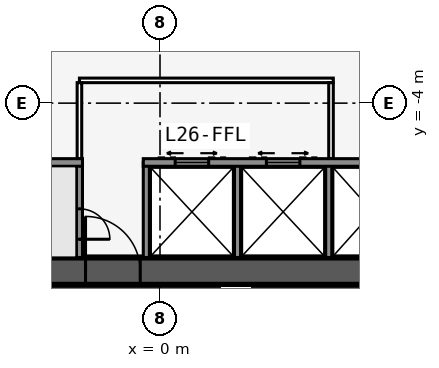
"""IFC4 building model, lengths in metres.
Left out: names, types, materials, properties, quantities, classifications, styles, units other than length and angle.
Written with IfcOpenShell. Run it as: python <this file> out.ifc"""

import sys

from ifc_helpers import new_model, si_unit, direction, frame, frame_2d, origin, place, context, subcontext, project, spatial, rectangle, extrude, element, fill, save


model = new_model("IFC4")
c1 = context("Model", 3, precision=1e-05, world=origin(), true_north=direction((0.0, 1.0)))
c2 = subcontext(c1, "Body", "Model", "MODEL_VIEW")
j1 = project(units=[si_unit("LENGTHUNIT", "METRE"), si_unit("PLANEANGLEUNIT", "RADIAN")], contexts=[c1])
p1 = place(None, origin())
s1 = spatial("IfcSite", under=j1, at=p1, CompositionType="ELEMENT")
p2 = place(p1, origin())
s2 = spatial("IfcBuilding", under=s1, at=p2, CompositionType="ELEMENT")
p3 = place(p2, frame((0.0, 0.0, 99.9)))
s3 = spatial("IfcBuildingStorey", under=s2, at=p3, CompositionType="ELEMENT", Elevation=99.9)
p4 = place(p3, frame((-16.5, -9.526, 0.0), z_axis=(0.0, 0.0, 1.0), x_axis=(1.0, 0.0, 0.0)))
e1 = element("IfcWall", 1, at=p4, inside=s3, PredefinedType="SHEAR", context=c2, shape_type="SweptSolid", body=[
    extrude(rectangle(XDim=33.0, YDim=0.9, at=frame_2d((16.5, 0.0))), origin(), (0.0, 0.0, 1.0), 3.4),
])
p5 = place(p4, frame((14.05, 0.0, 0.0)))
e2 = element("IfcOpeningElement", 2, at=p5, cuts=e1, PredefinedType="OPENING", context=c2, shape_type="SweptSolid", body=[
    extrude(rectangle(XDim=1.8, YDim=2.13, at=frame_2d((0.9, 1.065))), frame((0.0, 0.46, 0.0), z_axis=(0.0, -1.0, 0.0), x_axis=(1.0, 0.0, 0.0)), (0.0, 0.0, 1.0), 0.92),
])
p6 = place(p3, frame((-10.183, -5.951, 0.0), z_axis=(0.0, 0.0, 1.0), x_axis=(1.0, 0.0, 0.0)))
e3 = element("IfcWall", 3, at=p6, inside=s3, PredefinedType="SOLIDWALL", context=c2, shape_type="SweptSolid", body=[
    extrude(rectangle(XDim=7.633, YDim=0.25, at=frame_2d((3.816, 0.0))), origin(), (0.0, 0.0, 1.0), 3.15),
])
p7 = place(p3, frame((-0.55, -5.951, 0.0), z_axis=(0.0, 0.0, 1.0), x_axis=(1.0, 0.0, 0.0)))
e4 = element("IfcWall", 4, at=p7, inside=s3, PredefinedType="SOLIDWALL", context=c2, shape_type="SweptSolid", body=[
    extrude(rectangle(XDim=10.733, YDim=0.25, at=frame_2d((5.366, 0.0))), origin(), (0.0, 0.0, 1.0), 3.15),
])
p8 = place(p7, frame((9.314, 0.0, 0.0)))
e5 = element("IfcOpeningElement", 5, at=p8, cuts=e4, PredefinedType="OPENING", context=c2, shape_type="SweptSolid", body=[
    extrude(rectangle(XDim=0.9, YDim=2.13, at=frame_2d((0.45, 1.065))), frame((0.0, 0.135, 0.0), z_axis=(0.0, -1.0, 0.0), x_axis=(1.0, 0.0, 0.0)), (0.0, 0.0, 1.0), 0.27),
])
p9 = place(p7, frame((1.05, 0.0, 0.0)))
e6 = element("IfcOpeningElement", 6, at=p9, cuts=e4, PredefinedType="OPENING", context=c2, shape_type="SweptSolid", body=[
    extrude(rectangle(XDim=1.1, YDim=2.13, at=frame_2d((0.55, 1.065))), frame((0.0, 0.135, 0.0), z_axis=(0.0, -1.0, 0.0), x_axis=(1.0, 0.0, 0.0)), (0.0, 0.0, 1.0), 0.27),
])
p10 = place(p7, frame((4.05, 0.0, 0.0)))
e7 = element("IfcOpeningElement", 7, at=p10, cuts=e4, PredefinedType="OPENING", context=c2, shape_type="SweptSolid", body=[
    extrude(rectangle(XDim=1.1, YDim=2.13, at=frame_2d((0.55, 1.065))), frame((0.0, 0.135, 0.0), z_axis=(0.0, -1.0, 0.0), x_axis=(1.0, 0.0, 0.0)), (0.0, 0.0, 1.0), 0.27),
])
p11 = place(p3, frame((-2.65, -5.951, 0.0), z_axis=(0.0, 0.0, 1.0), x_axis=(0.0, -1.0, 0.0)))
e8 = element("IfcWall", 8, at=p11, inside=s3, PredefinedType="SOLIDWALL", context=c2, shape_type="SweptSolid", body=[
    extrude(rectangle(XDim=3.125, YDim=0.2, at=frame_2d((1.562, 0.0))), origin(), (0.0, 0.0, 1.0), 3.15),
])
p12 = place(p11, frame((1.525, 0.0, 0.0)))
e9 = element("IfcOpeningElement", 9, at=p12, cuts=e8, PredefinedType="OPENING", context=c2, shape_type="SweptSolid", body=[
    extrude(rectangle(XDim=1.0, YDim=2.13, at=frame_2d((0.5, 1.065))), frame((0.0, 0.11, 0.0), z_axis=(0.0, -1.0, 0.0), x_axis=(1.0, 0.0, 0.0)), (0.0, 0.0, 1.0), 0.22),
])
for number, where, z_axis, x_axis in (
    (10, (-0.45, -5.951, 0.0), (0.0, 0.0, 1.0), (0.0, -1.0, 0.0)),
    (11, (2.55, -5.951, 0.0), (0.0, 0.0, 1.0), (0.0, -1.0, 0.0)),
    (12, (5.55, -5.951, 0.0), (0.0, 0.0, 1.0), (0.0, -1.0, 0.0)),
):
    element("IfcWall", number, at=place(p3, frame(where, z_axis=z_axis, x_axis=x_axis)), inside=s3, PredefinedType="SOLIDWALL", context=c2, shape_type="SweptSolid", body=[
        extrude(rectangle(XDim=3.125, YDim=0.2, at=frame_2d((1.562, 0.0))), origin(), (0.0, 0.0, 1.0), 3.15),
    ])
p13 = place(p3, frame((16.5, -9.526, 0.0), z_axis=(0.0, 0.0, 1.0), x_axis=(-0.499999749417, 0.866025548458, 0.0)))
e13 = element("IfcWall", 13, at=p13, inside=s3, PredefinedType="SHEAR", context=c2, shape_type="SweptSolid", body=[
    extrude(rectangle(XDim=33.0, YDim=0.9, at=frame_2d((16.5, 0.0))), origin(), (0.0, 0.0, 1.0), 3.4),
])
p14 = place(p13, frame((14.15, 0.0, 0.0)))
e14 = element("IfcOpeningElement", 14, at=p14, cuts=e13, PredefinedType="OPENING", context=c2, shape_type="SweptSolid", body=[
    extrude(rectangle(XDim=1.8, YDim=2.13, at=frame_2d((0.9, 1.065))), frame((0.0, 0.46, 0.0), z_axis=(0.0, -1.0, 0.0), x_axis=(1.0, 0.0, 0.0)), (0.0, 0.0, 1.0), 0.92),
])
p15 = place(p13, frame((12.6, 0.0, 0.0)))
e15 = element("IfcOpeningElement", 15, at=p15, cuts=e13, PredefinedType="OPENING", context=c2, shape_type="SweptSolid", body=[
    extrude(rectangle(XDim=1.0, YDim=2.13, at=frame_2d((0.5, 1.065))), frame((0.0, 0.46, 0.0), z_axis=(0.0, -1.0, 0.0), x_axis=(1.0, 0.0, 0.0)), (0.0, 0.0, 1.0), 0.92),
])
p16 = place(p3, frame((10.245, -5.843, 0.0), z_axis=(0.0, 0.0, 1.0), x_axis=(-0.499993009313, 0.866029439822, 0.0)))
e16 = element("IfcWall", 16, at=p16, inside=s3, PredefinedType="SOLIDWALL", context=c2, shape_type="SweptSolid", body=[
    extrude(rectangle(XDim=7.733, YDim=0.25, at=frame_2d((3.866, 0.0))), origin(), (0.0, 0.0, 1.0), 3.15),
])
p17 = place(p3, frame((0.0, 19.052, 0.0), z_axis=(0.0, 0.0, 1.0), x_axis=(-0.499999749417, -0.866025548458, 0.0)))
e17 = element("IfcWall", 17, at=p17, inside=s3, PredefinedType="SHEAR", context=c2, shape_type="SweptSolid", body=[
    extrude(rectangle(XDim=33.0, YDim=0.9, at=frame_2d((16.5, 0.0))), origin(), (0.0, 0.0, 1.0), 3.4),
])
p18 = place(p17, frame((14.15, 0.0, 0.0)))
e18 = element("IfcOpeningElement", 18, at=p18, cuts=e17, PredefinedType="OPENING", context=c2, shape_type="SweptSolid", body=[
    extrude(rectangle(XDim=1.8, YDim=2.13, at=frame_2d((0.9, 1.065))), frame((0.0, 0.46, 0.0), z_axis=(0.0, -1.0, 0.0), x_axis=(1.0, 0.0, 0.0)), (0.0, 0.0, 1.0), 0.92),
])
p19 = place(p17, frame((12.6, 0.0, 0.0)))
e19 = element("IfcOpeningElement", 19, at=p19, cuts=e17, PredefinedType="OPENING", context=c2, shape_type="SweptSolid", body=[
    extrude(rectangle(XDim=1.0, YDim=2.13, at=frame_2d((0.5, 1.065))), frame((0.0, 0.46, 0.0), z_axis=(0.0, -1.0, 0.0), x_axis=(1.0, 0.0, 0.0)), (0.0, 0.0, 1.0), 0.92),
])
p20 = place(p3, frame((20.027, -10.985, 0.0), z_axis=(0.0, 0.0, 1.0), x_axis=(-0.500001677587, 0.866024435227, 0.0)))
e20 = element("IfcWall", 20, at=p20, inside=s3, PredefinedType="PARTITIONING", context=c2, shape_type="SweptSolid", body=[
    extrude(rectangle(XDim=39.054, YDim=0.15, at=frame_2d((19.527, 0.0))), origin(), (0.0, 0.0, 1.0), 3.15),
])
p21 = place(p20, frame((1.558, 0.0, 0.0)))
e21 = element("IfcOpeningElement", 21, at=p21, cuts=e20, PredefinedType="OPENING", context=c2, shape_type="SweptSolid", body=[
    extrude(rectangle(XDim=0.95, YDim=2.13, at=frame_2d((0.475, 1.065))), frame((0.0, 0.085, 0.0), z_axis=(0.0, -1.0, 0.0), x_axis=(1.0, 0.0, 0.0)), (0.0, 0.0, 1.0), 0.17),
])
p22 = place(p20, frame((11.552, 0.0, 0.0)))
e22 = element("IfcOpeningElement", 22, at=p22, cuts=e20, PredefinedType="OPENING", context=c2, shape_type="SweptSolid", body=[
    extrude(rectangle(XDim=0.95, YDim=2.13, at=frame_2d((0.475, 1.065))), frame((0.0, 0.085, 0.0), z_axis=(0.0, -1.0, 0.0), x_axis=(1.0, 0.0, 0.0)), (0.0, 0.0, 1.0), 0.17),
])
p23 = place(p20, frame((22.752, 0.0, 0.0)))
e23 = element("IfcOpeningElement", 23, at=p23, cuts=e20, PredefinedType="OPENING", context=c2, shape_type="SweptSolid", body=[
    extrude(rectangle(XDim=0.95, YDim=2.13, at=frame_2d((0.475, 1.065))), frame((0.0, 0.085, 0.0), z_axis=(0.0, -1.0, 0.0), x_axis=(1.0, 0.0, 0.0)), (0.0, 0.0, 1.0), 0.17),
])
p24 = place(p20, frame((36.546, 0.0, 0.0)))
e24 = element("IfcOpeningElement", 24, at=p24, cuts=e20, PredefinedType="OPENING", context=c2, shape_type="SweptSolid", body=[
    extrude(rectangle(XDim=0.95, YDim=2.13, at=frame_2d((0.475, 1.065))), frame((0.0, 0.085, 0.0), z_axis=(0.0, -1.0, 0.0), x_axis=(1.0, 0.0, 0.0)), (0.0, 0.0, 1.0), 0.17),
])
p25 = place(p3, frame((-0.5, 24.636, 0.0), z_axis=(0.0, 0.0, 1.0), x_axis=(-0.500001915564, -0.86602429783, 0.0)))
e25 = element("IfcWall", 25, at=p25, inside=s3, PredefinedType="PARTITIONING", context=c2, shape_type="SweptSolid", body=[
    extrude(rectangle(XDim=42.172, YDim=0.15, at=frame_2d((21.086, 0.0))), origin(), (0.0, 0.0, 1.0), 3.15),
])
p26 = place(p25, frame((1.911, 0.0, 0.0)))
e26 = element("IfcOpeningElement", 26, at=p26, cuts=e25, PredefinedType="OPENING", context=c2, shape_type="SweptSolid", body=[
    extrude(rectangle(XDim=0.95, YDim=2.13, at=frame_2d((0.475, 1.065))), frame((0.0, 0.085, 0.0), z_axis=(0.0, -1.0, 0.0), x_axis=(1.0, 0.0, 0.0)), (0.0, 0.0, 1.0), 0.17),
])
p27 = place(p25, frame((8.111, 0.0, 0.0)))
e27 = element("IfcOpeningElement", 27, at=p27, cuts=e25, PredefinedType="OPENING", context=c2, shape_type="SweptSolid", body=[
    extrude(rectangle(XDim=0.95, YDim=2.13, at=frame_2d((0.475, 1.065))), frame((0.0, 0.085, 0.0), z_axis=(0.0, -1.0, 0.0), x_axis=(1.0, 0.0, 0.0)), (0.0, 0.0, 1.0), 0.17),
])
p28 = place(p25, frame((18.111, 0.0, 0.0)))
e28 = element("IfcOpeningElement", 28, at=p28, cuts=e25, PredefinedType="OPENING", context=c2, shape_type="SweptSolid", body=[
    extrude(rectangle(XDim=0.95, YDim=2.13, at=frame_2d((0.475, 1.065))), frame((0.0, 0.085, 0.0), z_axis=(0.0, -1.0, 0.0), x_axis=(1.0, 0.0, 0.0)), (0.0, 0.0, 1.0), 0.17),
])
p29 = place(p25, frame((28.711, 0.0, 0.0)))
e29 = element("IfcOpeningElement", 29, at=p29, cuts=e25, PredefinedType="OPENING", context=c2, shape_type="SweptSolid", body=[
    extrude(rectangle(XDim=0.95, YDim=2.13, at=frame_2d((0.475, 1.065))), frame((0.0, 0.085, 0.0), z_axis=(0.0, -1.0, 0.0), x_axis=(1.0, 0.0, 0.0)), (0.0, 0.0, 1.0), 0.17),
])
p30 = place(p25, frame((33.711, 0.0, 0.0)))
e30 = element("IfcOpeningElement", 30, at=p30, cuts=e25, PredefinedType="OPENING", context=c2, shape_type="SweptSolid", body=[
    extrude(rectangle(XDim=0.95, YDim=2.13, at=frame_2d((0.475, 1.065))), frame((0.0, 0.085, 0.0), z_axis=(0.0, -1.0, 0.0), x_axis=(1.0, 0.0, 0.0)), (0.0, 0.0, 1.0), 0.17),
])
p31 = place(p25, frame((39.311, 0.0, 0.0)))
e31 = element("IfcOpeningElement", 31, at=p31, cuts=e25, PredefinedType="OPENING", context=c2, shape_type="SweptSolid", body=[
    extrude(rectangle(XDim=0.95, YDim=2.13, at=frame_2d((0.475, 1.065))), frame((0.0, 0.085, 0.0), z_axis=(0.0, -1.0, 0.0), x_axis=(1.0, 0.0, 0.0)), (0.0, 0.0, 1.0), 0.17),
])
p32 = place(p3, frame((-2.65, -3.251, 0.0), z_axis=(0.0, 0.0, 1.0), x_axis=(1.0, 0.0, 0.0)))
e32 = element("IfcWall", 32, at=p32, inside=s3, PredefinedType="PARTITIONING", context=c2, shape_type="SweptSolid", body=[
    extrude(rectangle(XDim=8.35, YDim=0.15, at=frame_2d((4.175, 0.0))), origin(), (0.0, 0.0, 1.0), 3.15),
])
for number, where, z_axis, x_axis in (
    (33, (-2.65, -5.826, 0.0), (0.0, 0.0, 1.0), (0.0, 1.0, 0.0)),
    (34, (5.625, -5.826, 0.0), (0.0, 0.0, 1.0), (0.0, 1.0, 0.0)),
):
    element("IfcWall", number, at=place(p3, frame(where, z_axis=z_axis, x_axis=x_axis)), inside=s3, PredefinedType="PARTITIONING", context=c2, shape_type="SweptSolid", body=[
        extrude(rectangle(XDim=2.5, YDim=0.15, at=frame_2d((1.25, 0.0))), origin(), (0.0, 0.0, 1.0), 3.15),
    ])
p33 = place(p5, origin())
e35 = element("IfcDoor", 35, at=p33, inside=s3, OperationType="DOUBLE_DOOR_SINGLE_SWING", PredefinedType="DOOR", context=c2, shape_type="SweptSolid", body=[
    extrude(rectangle(XDim=1.8, YDim=2.13, at=frame_2d((0.9, 1.065))), frame((0.0, 0.025, 0.0), z_axis=(0.0, -1.0, 0.0), x_axis=(1.0, 0.0, 0.0)), (0.0, 0.0, 1.0), 0.05),
])
fill(e2, e35)
p34 = place(p12, origin())
e36 = element("IfcDoor", 36, at=p34, inside=s3, OperationType="SINGLE_SWING_RIGHT", PredefinedType="DOOR", context=c2, shape_type="SweptSolid", body=[
    extrude(rectangle(XDim=1.0, YDim=2.13, at=frame_2d((0.5, 1.065))), frame((0.0, 0.025, 0.0), z_axis=(0.0, -1.0, 0.0), x_axis=(1.0, 0.0, 0.0)), (0.0, 0.0, 1.0), 0.05),
])
fill(e9, e36)
p35 = place(p9, origin())
e37 = element("IfcDoor", 37, at=p35, inside=s3, OperationType="DOUBLE_DOOR_SLIDING", PredefinedType="USERDEFINED", context=c2, shape_type="SweptSolid", body=[
    extrude(rectangle(XDim=1.1, YDim=2.13, at=frame_2d((0.55, 1.065))), frame((0.0, 0.025, 0.0), z_axis=(0.0, -1.0, 0.0), x_axis=(1.0, 0.0, 0.0)), (0.0, 0.0, 1.0), 0.05),
])
fill(e6, e37)
p36 = place(p10, origin())
e38 = element("IfcDoor", 38, at=p36, inside=s3, OperationType="DOUBLE_DOOR_SLIDING", PredefinedType="USERDEFINED", context=c2, shape_type="SweptSolid", body=[
    extrude(rectangle(XDim=1.1, YDim=2.13, at=frame_2d((0.55, 1.065))), frame((0.0, 0.025, 0.0), z_axis=(0.0, -1.0, 0.0), x_axis=(1.0, 0.0, 0.0)), (0.0, 0.0, 1.0), 0.05),
])
fill(e7, e38)
save(model, sys.argv[1])
